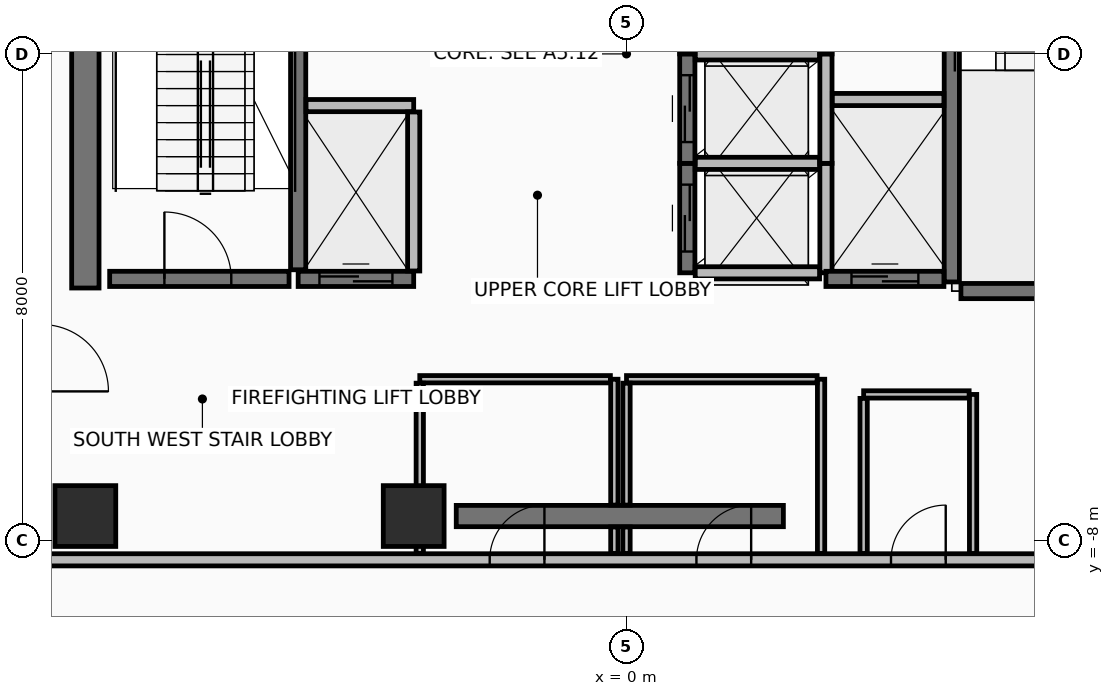
"""IFC4 building model, lengths in metres.
Left out: names, types, materials, properties, quantities, classifications, styles, units other than length and angle.
Written with IfcOpenShell. Run it as: python <this file> out.ifc"""

import sys

from ifc_helpers import new_model, si_unit, direction, frame, frame_2d, origin, origin_2d, place, context, subcontext, project, spatial, rectangle, extrude, element, fill, save


model = new_model("IFC4")
c1 = context("Model", 3, precision=1e-05, world=origin(), true_north=direction((0.0, 1.0)))
c2 = subcontext(c1, "Body", "Model", "MODEL_VIEW")
j1 = project(units=[si_unit("LENGTHUNIT", "METRE"), si_unit("PLANEANGLEUNIT", "RADIAN")], contexts=[c1])
p1 = place(None, origin())
s1 = spatial("IfcSite", under=j1, at=p1, CompositionType="ELEMENT")
p2 = place(p1, origin())
s2 = spatial("IfcBuilding", under=s1, at=p2, CompositionType="ELEMENT")
p3 = place(p2, frame((0.0, 0.0, 234.25)))
s3 = spatial("IfcBuildingStorey", under=s2, at=p3, CompositionType="ELEMENT", Elevation=234.25)
for number, where, z_axis, x_axis in (
    (1, (-8.9, -7.6, 0.0), (0.0, 0.0, 1.0), (1.0, 0.0, 0.0)),
    (2, (-3.5, -7.6, 0.0), (0.0, 0.0, 1.0), (1.0, 0.0, 0.0)),
):
    element("IfcColumn", number, at=place(p3, frame(where, z_axis=z_axis, x_axis=x_axis)), inside=s3, PredefinedType="COLUMN", context=c2, shape_type="SweptSolid", body=[
        extrude(rectangle(XDim=1.0, YDim=1.0, at=origin_2d()), origin(), (0.0, 0.0, 1.0), 3.6),
    ])
p4 = place(p3, frame((-2.8, -7.6, 0.0), z_axis=(0.0, 0.0, 1.0), x_axis=(1.0, 0.0, 0.0)))
e3 = element("IfcWall", 3, at=p4, inside=s3, PredefinedType="SHEAR", context=c2, shape_type="SweptSolid", body=[
    extrude(rectangle(XDim=5.38, YDim=0.35, at=frame_2d((2.69, 0.0))), origin(), (0.0, 0.0, 1.0), 3.42),
])
p5 = place(p3, frame((-8.9, -3.85, 0.0), z_axis=(0.0, 0.0, 1.0), x_axis=(0.0, 1.0, 0.0)))
e4 = element("IfcWall", 4, at=p5, inside=s3, PredefinedType="SHEAR", context=c2, shape_type="SweptSolid", body=[
    extrude(rectangle(XDim=10.7, YDim=0.45, at=frame_2d((5.35, 0.0))), origin(), (0.0, 0.0, 1.0), 3.42),
])
p6 = place(p3, frame((-9.62, -8.32, 0.0), z_axis=(0.0, 0.0, 1.0), x_axis=(1.0, 0.0, 0.0)))
e5 = element("IfcWall", 5, at=p6, inside=s3, PredefinedType="PARTITIONING", context=c2, shape_type="SweptSolid", body=[
    extrude(rectangle(XDim=19.24, YDim=0.2, at=frame_2d((9.62, 0.0))), origin(), (0.0, 0.0, 1.0), 2.915),
])
p7 = place(p6, frame((7.37, 0.0, 0.0)))
e6 = element("IfcOpeningElement", 6, at=p7, cuts=e5, PredefinedType="OPENING", context=c2, shape_type="SweptSolid", body=[
    extrude(rectangle(XDim=0.9, YDim=2.1, at=frame_2d((0.45, 1.05))), frame((0.0, 0.11, 0.0), z_axis=(0.0, -1.0, 0.0), x_axis=(1.0, 0.0, 0.0)), (0.0, 0.0, 1.0), 0.22),
])
p8 = place(p6, frame((10.77, 0.0, 0.0)))
e7 = element("IfcOpeningElement", 7, at=p8, cuts=e5, PredefinedType="OPENING", context=c2, shape_type="SweptSolid", body=[
    extrude(rectangle(XDim=0.9, YDim=2.1, at=frame_2d((0.45, 1.05))), frame((0.0, 0.11, 0.0), z_axis=(0.0, -1.0, 0.0), x_axis=(1.0, 0.0, 0.0)), (0.0, 0.0, 1.0), 0.22),
])
p9 = place(p6, frame((13.97, 0.0, 0.0)))
e8 = element("IfcOpeningElement", 8, at=p9, cuts=e5, PredefinedType="OPENING", context=c2, shape_type="SweptSolid", body=[
    extrude(rectangle(XDim=0.9, YDim=2.1, at=frame_2d((0.45, 1.05))), frame((0.0, 0.11, 0.0), z_axis=(0.0, -1.0, 0.0), x_axis=(1.0, 0.0, 0.0)), (0.0, 0.0, 1.0), 0.22),
])
p10 = place(p3, frame((-5.4, -3.55, 0.0), z_axis=(0.0, 0.0, 1.0), x_axis=(0.0, 1.0, 0.0)))
e9 = element("IfcWall", 9, at=p10, inside=s3, PredefinedType="SHEAR", context=c2, shape_type="SweptSolid", body=[
    extrude(rectangle(XDim=7.3, YDim=0.25, at=frame_2d((3.65, 0.0))), origin(), (0.0, 0.0, 1.0), 3.42),
])
p11 = place(p3, frame((-8.5, -3.7, 0.0), z_axis=(0.0, 0.0, 1.0), x_axis=(1.0, 0.0, 0.0)))
e10 = element("IfcWall", 10, at=p11, inside=s3, PredefinedType="SHEAR", context=c2, shape_type="SweptSolid", body=[
    extrude(rectangle(XDim=2.95, YDim=0.25, at=frame_2d((1.475, 0.0))), origin(), (0.0, 0.0, 1.0), 3.42),
])
p12 = place(p11, frame((0.9, 0.0, 0.0)))
e11 = element("IfcOpeningElement", 11, at=p12, cuts=e10, PredefinedType="OPENING", context=c2, shape_type="SweptSolid", body=[
    extrude(rectangle(XDim=1.1, YDim=2.15, at=frame_2d((0.55, 1.075))), frame((0.0, 0.135, 0.0), z_axis=(0.0, -1.0, 0.0), x_axis=(1.0, 0.0, 0.0)), (0.0, 0.0, 1.0), 0.27),
])
p13 = place(p3, frame((5.35, -3.75, 0.0), z_axis=(0.0, 0.0, 1.0), x_axis=(0.0, 1.0, 0.0)))
e12 = element("IfcWall", 12, at=p13, inside=s3, PredefinedType="SHEAR", context=c2, shape_type="SweptSolid", body=[
    extrude(rectangle(XDim=7.3, YDim=0.25, at=frame_2d((3.65, 0.0))), origin(), (0.0, 0.0, 1.0), 3.42),
])
p14 = place(p3, frame((5.5, -3.9, 0.0), z_axis=(0.0, 0.0, 1.0), x_axis=(1.0, 0.0, 0.0)))
e13 = element("IfcWall", 13, at=p14, inside=s3, PredefinedType="SHEAR", context=c2, shape_type="SweptSolid", body=[
    extrude(rectangle(XDim=3.0, YDim=0.25, at=frame_2d((1.5, 0.0))), origin(), (0.0, 0.0, 1.0), 3.42),
])
p15 = place(p3, frame((1.0, -3.6, 0.0), z_axis=(0.0, 0.0, 1.0), x_axis=(0.0, 1.0, 0.0)))
e14 = element("IfcWall", 14, at=p15, inside=s3, PredefinedType="SHEAR", context=c2, shape_type="SweptSolid", body=[
    extrude(rectangle(XDim=1.8, YDim=0.25, at=frame_2d((0.9, 0.0))), origin(), (0.0, 0.0, 1.0), 3.42),
])
p16 = place(p15, frame((0.35, 0.0, 0.0)))
e15 = element("IfcOpeningElement", 15, at=p16, cuts=e14, PredefinedType="OPENING", context=c2, shape_type="SweptSolid", body=[
    extrude(rectangle(XDim=1.1, YDim=2.2, at=frame_2d((0.55, 1.1))), frame((0.0, 0.135, 0.0), z_axis=(0.0, -1.0, 0.0), x_axis=(1.0, 0.0, 0.0)), (0.0, 0.0, 1.0), 0.27),
])
p17 = place(p3, frame((3.28, -3.6, 0.0), z_axis=(0.0, 0.0, 1.0), x_axis=(0.0, 1.0, 0.0)))
e16 = element("IfcWall", 16, at=p17, inside=s3, PredefinedType="PARTITIONING", context=c2, shape_type="SweptSolid", body=[
    extrude(rectangle(XDim=1.8, YDim=0.2, at=frame_2d((0.9, 0.0))), origin(), (0.0, 0.0, 1.0), 3.42),
])
for number, where, z_axis, x_axis in (
    (17, (1.13, -3.6, 0.0), (0.0, 0.0, 1.0), (1.0, 0.0, 0.0)),
    (18, (1.13, -1.8, 0.0), (0.0, 0.0, 1.0), (1.0, 0.0, 0.0)),
):
    element("IfcWall", number, at=place(p3, frame(where, z_axis=z_axis, x_axis=x_axis)), inside=s3, PredefinedType="PARTITIONING", context=c2, shape_type="SweptSolid", body=[
        extrude(rectangle(XDim=2.045, YDim=0.2, at=frame_2d((1.022, 0.0))), origin(), (0.0, 0.0, 1.0), 3.42),
    ])
p18 = place(p3, frame((1.0, -1.8, 0.0), z_axis=(0.0, 0.0, 1.0), x_axis=(0.0, 1.0, 0.0)))
e19 = element("IfcWall", 19, at=p18, inside=s3, PredefinedType="SHEAR", context=c2, shape_type="SweptSolid", body=[
    extrude(rectangle(XDim=1.8, YDim=0.25, at=frame_2d((0.9, 0.0))), origin(), (0.0, 0.0, 1.0), 3.42),
])
p19 = place(p18, frame((0.35, 0.0, 0.0)))
e20 = element("IfcOpeningElement", 20, at=p19, cuts=e19, PredefinedType="OPENING", context=c2, shape_type="SweptSolid", body=[
    extrude(rectangle(XDim=1.1, YDim=2.2, at=frame_2d((0.55, 1.1))), frame((0.0, 0.135, 0.0), z_axis=(0.0, -1.0, 0.0), x_axis=(1.0, 0.0, 0.0)), (0.0, 0.0, 1.0), 0.27),
])
p20 = place(p3, frame((3.28, -1.8, 0.0), z_axis=(0.0, 0.0, 1.0), x_axis=(0.0, 1.0, 0.0)))
e21 = element("IfcWall", 21, at=p20, inside=s3, PredefinedType="PARTITIONING", context=c2, shape_type="SweptSolid", body=[
    extrude(rectangle(XDim=1.8, YDim=0.2, at=frame_2d((0.9, 0.0))), origin(), (0.0, 0.0, 1.0), 3.42),
])
p21 = place(p3, frame((1.13, 0.0, 0.0), z_axis=(0.0, 0.0, 1.0), x_axis=(1.0, 0.0, 0.0)))
e22 = element("IfcWall", 22, at=p21, inside=s3, PredefinedType="PARTITIONING", context=c2, shape_type="SweptSolid", body=[
    extrude(rectangle(XDim=2.045, YDim=0.2, at=frame_2d((1.022, 0.0))), origin(), (0.0, 0.0, 1.0), 3.42),
])
p22 = place(p3, frame((1.0, 0.0, 0.0), z_axis=(0.0, 0.0, 1.0), x_axis=(0.0, 1.0, 0.0)))
e23 = element("IfcWall", 23, at=p22, inside=s3, PredefinedType="SHEAR", context=c2, shape_type="SweptSolid", body=[
    extrude(rectangle(XDim=1.8, YDim=0.25, at=frame_2d((0.9, 0.0))), origin(), (0.0, 0.0, 1.0), 3.42),
])
p23 = place(p22, frame((0.35, 0.0, 0.0)))
e24 = element("IfcOpeningElement", 24, at=p23, cuts=e23, PredefinedType="OPENING", context=c2, shape_type="SweptSolid", body=[
    extrude(rectangle(XDim=1.1, YDim=2.2, at=frame_2d((0.55, 1.1))), frame((0.0, 0.135, 0.0), z_axis=(0.0, -1.0, 0.0), x_axis=(1.0, 0.0, 0.0)), (0.0, 0.0, 1.0), 0.27),
])
p24 = place(p3, frame((3.28, 0.0, 0.0), z_axis=(0.0, 0.0, 1.0), x_axis=(0.0, 1.0, 0.0)))
e25 = element("IfcWall", 25, at=p24, inside=s3, PredefinedType="PARTITIONING", context=c2, shape_type="SweptSolid", body=[
    extrude(rectangle(XDim=1.8, YDim=0.2, at=frame_2d((0.9, 0.0))), origin(), (0.0, 0.0, 1.0), 3.42),
])
p25 = place(p3, frame((-5.4, -3.7, 0.0), z_axis=(0.0, 0.0, 1.0), x_axis=(1.0, 0.0, 0.0)))
e26 = element("IfcWall", 26, at=p25, inside=s3, PredefinedType="SHEAR", context=c2, shape_type="SweptSolid", body=[
    extrude(rectangle(XDim=1.9, YDim=0.25, at=frame_2d((0.95, 0.0))), origin(), (0.0, 0.0, 1.0), 3.42),
])
p26 = place(p25, frame((0.35, 0.0, 0.0)))
e27 = element("IfcOpeningElement", 27, at=p26, cuts=e26, PredefinedType="OPENING", context=c2, shape_type="SweptSolid", body=[
    extrude(rectangle(XDim=1.2, YDim=2.2, at=frame_2d((0.6, 1.1))), frame((0.0, 0.135, 0.0), z_axis=(0.0, -1.0, 0.0), x_axis=(1.0, 0.0, 0.0)), (0.0, 0.0, 1.0), 0.27),
])
p27 = place(p3, frame((-5.27, -0.85, 0.0), z_axis=(0.0, 0.0, 1.0), x_axis=(1.0, 0.0, 0.0)))
e28 = element("IfcWall", 28, at=p27, inside=s3, PredefinedType="PARTITIONING", context=c2, shape_type="SweptSolid", body=[
    extrude(rectangle(XDim=1.77, YDim=0.2, at=frame_2d((0.885, 0.0))), origin(), (0.0, 0.0, 1.0), 3.42),
])
p28 = place(p3, frame((-3.5, -3.57, 0.0), z_axis=(0.0, 0.0, 1.0), x_axis=(0.0, 1.0, 0.0)))
e29 = element("IfcWall", 29, at=p28, inside=s3, PredefinedType="PARTITIONING", context=c2, shape_type="SweptSolid", body=[
    extrude(rectangle(XDim=2.615, YDim=0.2, at=frame_2d((1.308, 0.0))), origin(), (0.0, 0.0, 1.0), 3.42),
])
p29 = place(p3, frame((3.28, -3.7, 0.0), z_axis=(0.0, 0.0, 1.0), x_axis=(1.0, 0.0, 0.0)))
e30 = element("IfcWall", 30, at=p29, inside=s3, PredefinedType="SHEAR", context=c2, shape_type="SweptSolid", body=[
    extrude(rectangle(XDim=1.94, YDim=0.25, at=frame_2d((0.97, 0.0))), origin(), (0.0, 0.0, 1.0), 3.42),
])
p30 = place(p29, frame((0.42, 0.0, 0.0)))
e31 = element("IfcOpeningElement", 31, at=p30, cuts=e30, PredefinedType="OPENING", context=c2, shape_type="SweptSolid", body=[
    extrude(rectangle(XDim=1.1, YDim=2.2, at=frame_2d((0.55, 1.1))), frame((0.0, 0.135, 0.0), z_axis=(0.0, -1.0, 0.0), x_axis=(1.0, 0.0, 0.0)), (0.0, 0.0, 1.0), 0.27),
])
p31 = place(p3, frame((3.385, -0.75, 0.0), z_axis=(0.0, 0.0, 1.0), x_axis=(1.0, 0.0, 0.0)))
e32 = element("IfcWall", 32, at=p31, inside=s3, PredefinedType="PARTITIONING", context=c2, shape_type="SweptSolid", body=[
    extrude(rectangle(XDim=1.835, YDim=0.2, at=frame_2d((0.917, 0.0))), origin(), (0.0, 0.0, 1.0), 3.42),
])
p32 = place(p3, frame((-0.2, -8.215, 0.0), z_axis=(0.0, 0.0, 1.0), x_axis=(0.0, 1.0, 0.0)))
e33 = element("IfcWall", 33, at=p32, inside=s3, PredefinedType="PARTITIONING", context=c2, shape_type="SweptSolid", body=[
    extrude(rectangle(XDim=0.435, YDim=0.12, at=frame_2d((0.218, 0.0))), origin(), (0.0, 0.0, 1.0), 2.715),
])
p33 = place(p3, frame((-0.2, -7.42, 0.0), z_axis=(0.0, 0.0, 1.0), x_axis=(0.0, 1.0, 0.0)))
e34 = element("IfcWall", 34, at=p33, inside=s3, PredefinedType="PARTITIONING", context=c2, shape_type="SweptSolid", body=[
    extrude(rectangle(XDim=2.07, YDim=0.12, at=frame_2d((1.035, 0.0))), origin(), (0.0, 0.0, 1.0), 2.715),
])
p34 = place(p3, frame((-0.265, -5.35, 0.0), z_axis=(0.0, 0.0, 1.0), x_axis=(-1.0, 0.0, 0.0)))
e35 = element("IfcWall", 35, at=p34, inside=s3, PredefinedType="PARTITIONING", context=c2, shape_type="SweptSolid", body=[
    extrude(rectangle(XDim=3.135, YDim=0.12, at=frame_2d((1.567, 0.0))), origin(), (0.0, 0.0, 1.0), 2.715),
])
p35 = place(p3, frame((-3.4, -5.415, 0.0), z_axis=(0.0, 0.0, 1.0), x_axis=(0.0, -1.0, 0.0)))
e36 = element("IfcWall", 36, at=p35, inside=s3, PredefinedType="PARTITIONING", context=c2, shape_type="SweptSolid", body=[
    extrude(rectangle(XDim=2.8, YDim=0.12, at=frame_2d((1.4, 0.0))), origin(), (0.0, 0.0, 1.0), 2.715),
])
p36 = place(p3, frame((3.2, -8.215, 0.0), z_axis=(0.0, 0.0, 1.0), x_axis=(0.0, 1.0, 0.0)))
e37 = element("IfcWall", 37, at=p36, inside=s3, PredefinedType="PARTITIONING", context=c2, shape_type="SweptSolid", body=[
    extrude(rectangle(XDim=2.865, YDim=0.12, at=frame_2d((1.433, 0.0))), origin(), (0.0, 0.0, 1.0), 2.715),
])
p37 = place(p3, frame((3.135, -5.35, 0.0), z_axis=(0.0, 0.0, 1.0), x_axis=(-1.0, 0.0, 0.0)))
e38 = element("IfcWall", 38, at=p37, inside=s3, PredefinedType="PARTITIONING", context=c2, shape_type="SweptSolid", body=[
    extrude(rectangle(XDim=3.135, YDim=0.12, at=frame_2d((1.567, 0.0))), origin(), (0.0, 0.0, 1.0), 3.42),
])
p38 = place(p3, frame((0.0, -5.415, 0.0), z_axis=(0.0, 0.0, 1.0), x_axis=(0.0, -1.0, 0.0)))
e39 = element("IfcWall", 39, at=p38, inside=s3, PredefinedType="PARTITIONING", context=c2, shape_type="SweptSolid", body=[
    extrude(rectangle(XDim=2.005, YDim=0.12, at=frame_2d((1.002, 0.0))), origin(), (0.0, 0.0, 1.0), 2.715),
])
p39 = place(p3, frame((0.0, -7.78, 0.0), z_axis=(0.0, 0.0, 1.0), x_axis=(0.0, -1.0, 0.0)))
e40 = element("IfcWall", 40, at=p39, inside=s3, PredefinedType="PARTITIONING", context=c2, shape_type="SweptSolid", body=[
    extrude(rectangle(XDim=0.435, YDim=0.12, at=frame_2d((0.218, 0.0))), origin(), (0.0, 0.0, 1.0), 2.715),
])
p40 = place(p3, frame((5.7, -8.215, 0.0), z_axis=(0.0, 0.0, 1.0), x_axis=(0.0, 1.0, 0.0)))
e41 = element("IfcWall", 41, at=p40, inside=s3, PredefinedType="PARTITIONING", context=c2, shape_type="SweptSolid", body=[
    extrude(rectangle(XDim=2.615, YDim=0.12, at=frame_2d((1.308, 0.0))), origin(), (0.0, 0.0, 1.0), 2.715),
])
p41 = place(p3, frame((5.635, -5.6, 0.0), z_axis=(0.0, 0.0, 1.0), x_axis=(-1.0, 0.0, 0.0)))
e42 = element("IfcWall", 42, at=p41, inside=s3, PredefinedType="PARTITIONING", context=c2, shape_type="SweptSolid", body=[
    extrude(rectangle(XDim=1.735, YDim=0.12, at=frame_2d((0.868, 0.0))), origin(), (0.0, 0.0, 1.0), 3.42),
])
p42 = place(p3, frame((3.9, -5.665, 0.0), z_axis=(0.0, 0.0, 1.0), x_axis=(0.0, -1.0, 0.0)))
e43 = element("IfcWall", 43, at=p42, inside=s3, PredefinedType="PARTITIONING", context=c2, shape_type="SweptSolid", body=[
    extrude(rectangle(XDim=2.55, YDim=0.12, at=frame_2d((1.275, 0.0))), origin(), (0.0, 0.0, 1.0), 2.715),
])
p43 = place(p12, origin())
e44 = element("IfcDoor", 44, at=p43, inside=s3, OperationType="SINGLE_SWING_LEFT", PredefinedType="DOOR", context=c2, shape_type="SweptSolid", body=[
    extrude(rectangle(XDim=1.1, YDim=2.15, at=frame_2d((0.55, 1.075))), frame((0.0, 0.025, 0.0), z_axis=(0.0, -1.0, 0.0), x_axis=(1.0, 0.0, 0.0)), (0.0, 0.0, 1.0), 0.05),
])
fill(e11, e44)
p44 = place(p16, origin())
e45 = element("IfcDoor", 45, at=p44, inside=s3, OperationType="SLIDING_TO_LEFT", PredefinedType="DOOR", context=c2, shape_type="SweptSolid", body=[
    extrude(rectangle(XDim=1.1, YDim=2.2, at=frame_2d((0.55, 1.1))), frame((0.0, 0.025, 0.0), z_axis=(0.0, -1.0, 0.0), x_axis=(1.0, 0.0, 0.0)), (0.0, 0.0, 1.0), 0.05),
])
fill(e15, e45)
p45 = place(p19, origin())
e46 = element("IfcDoor", 46, at=p45, inside=s3, OperationType="SLIDING_TO_LEFT", PredefinedType="DOOR", context=c2, shape_type="SweptSolid", body=[
    extrude(rectangle(XDim=1.1, YDim=2.2, at=frame_2d((0.55, 1.1))), frame((0.0, 0.025, 0.0), z_axis=(0.0, -1.0, 0.0), x_axis=(1.0, 0.0, 0.0)), (0.0, 0.0, 1.0), 0.05),
])
fill(e20, e46)
p46 = place(p26, origin())
e47 = element("IfcDoor", 47, at=p46, inside=s3, OperationType="SLIDING_TO_RIGHT", PredefinedType="DOOR", context=c2, shape_type="SweptSolid", body=[
    extrude(rectangle(XDim=1.2, YDim=2.2, at=frame_2d((0.6, 1.1))), frame((0.0, 0.025, 0.0), z_axis=(0.0, -1.0, 0.0), x_axis=(1.0, 0.0, 0.0)), (0.0, 0.0, 1.0), 0.05),
])
fill(e27, e47)
p47 = place(p30, origin())
e48 = element("IfcDoor", 48, at=p47, inside=s3, OperationType="SLIDING_TO_LEFT", PredefinedType="DOOR", context=c2, shape_type="SweptSolid", body=[
    extrude(rectangle(XDim=1.1, YDim=2.2, at=frame_2d((0.55, 1.1))), frame((0.0, 0.025, 0.0), z_axis=(0.0, -1.0, 0.0), x_axis=(1.0, 0.0, 0.0)), (0.0, 0.0, 1.0), 0.05),
])
fill(e31, e48)
p48 = place(p7, frame((0.9, 0.0, 0.0), z_axis=(0.0, 0.0, 1.0), x_axis=(-1.0, 0.0, 0.0)))
e49 = element("IfcDoor", 49, at=p48, inside=s3, OperationType="SINGLE_SWING_LEFT", PredefinedType="DOOR", context=c2, shape_type="SweptSolid", body=[
    extrude(rectangle(XDim=0.9, YDim=2.1, at=frame_2d((0.45, 1.05))), frame((0.0, 0.025, 0.0), z_axis=(0.0, -1.0, 0.0), x_axis=(1.0, 0.0, 0.0)), (0.0, 0.0, 1.0), 0.05),
])
fill(e6, e49)
p49 = place(p8, frame((0.9, 0.0, 0.0), z_axis=(0.0, 0.0, 1.0), x_axis=(-1.0, 0.0, 0.0)))
e50 = element("IfcDoor", 50, at=p49, inside=s3, OperationType="SINGLE_SWING_LEFT", PredefinedType="DOOR", context=c2, shape_type="SweptSolid", body=[
    extrude(rectangle(XDim=0.9, YDim=2.1, at=frame_2d((0.45, 1.05))), frame((0.0, 0.025, 0.0), z_axis=(0.0, -1.0, 0.0), x_axis=(1.0, 0.0, 0.0)), (0.0, 0.0, 1.0), 0.05),
])
fill(e7, e50)
p50 = place(p9, frame((0.9, 0.0, 0.0), z_axis=(0.0, 0.0, 1.0), x_axis=(-1.0, 0.0, 0.0)))
e51 = element("IfcDoor", 51, at=p50, inside=s3, OperationType="SINGLE_SWING_LEFT", PredefinedType="DOOR", context=c2, shape_type="SweptSolid", body=[
    extrude(rectangle(XDim=0.9, YDim=2.1, at=frame_2d((0.45, 1.05))), frame((0.0, 0.025, 0.0), z_axis=(0.0, -1.0, 0.0), x_axis=(1.0, 0.0, 0.0)), (0.0, 0.0, 1.0), 0.05),
])
fill(e8, e51)
save(model, sys.argv[1])
